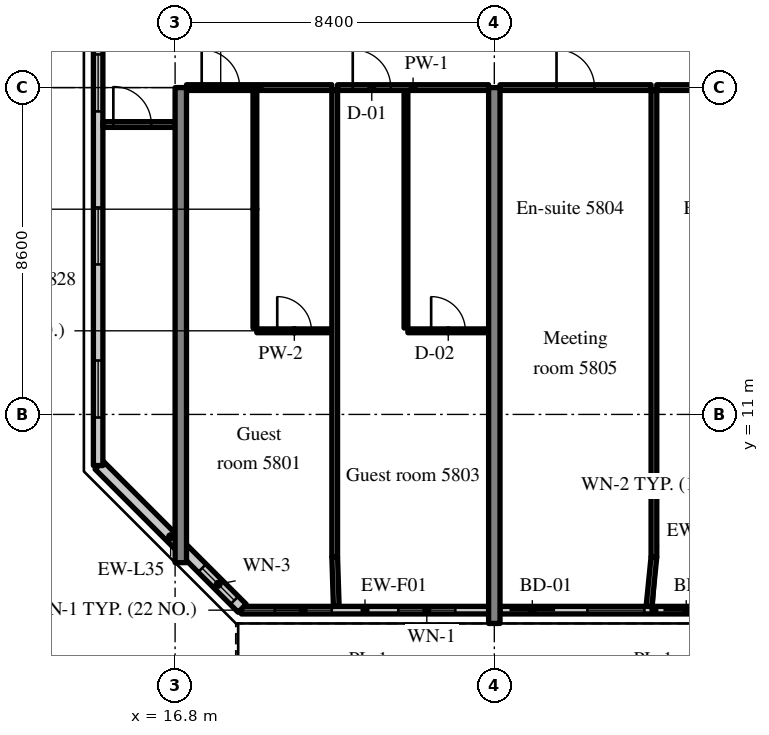
"""IFC4 building model, lengths in metres.
Left out: names, types, materials, properties, quantities, classifications, styles, units other than length and angle.
Written with IfcOpenShell. Run it as: python <this file> out.ifc"""

import sys

from ifc_helpers import new_model, si_unit, direction, frame, frame_2d, origin, place, context, subcontext, project, spatial, rectangle, extrude, source, transform, mapped, element, fill, save


model = new_model("IFC4")
c1 = context("Model", 3, precision=1e-05, world=origin(), true_north=direction((0.0, 1.0)))
c2 = subcontext(c1, "Body", "Model", "MODEL_VIEW")
j1 = project(units=[si_unit("LENGTHUNIT", "METRE"), si_unit("PLANEANGLEUNIT", "RADIAN")], contexts=[c1])
p1 = place(None, origin())
s1 = spatial("IfcSite", under=j1, at=p1, CompositionType="ELEMENT")
p2 = place(p1, origin())
s2 = spatial("IfcBuilding", under=s1, at=p2, CompositionType="ELEMENT")
p3 = place(p2, frame((0.0, 0.0, 241.3)))
s3 = spatial("IfcBuildingStorey", under=s2, at=p3, CompositionType="ELEMENT", Elevation=241.3)
m1 = source(origin(), c2, "Body", "SweptSolid", [
    extrude(rectangle(XDim=12.5, YDim=0.3, at=frame_2d((6.25, 0.0))), origin(), (0.0, 0.0, 1.0), 3.62),
])
p4 = place(p3, frame((16.95, 7.1, 0.0), z_axis=(0.0, 0.0, 1.0), x_axis=(0.0, 1.0, 0.0)))
e1 = element("IfcWall", 1, at=p4, inside=s3, PredefinedType="SHEAR", context=c2, shape_type="MappedRepresentation", body=[
    mapped(m1, transform((0.0, 0.0, 0.0), scale=1.0)),
])
m2 = source(origin(), c2, "Body", "SweptSolid", [
    extrude(rectangle(XDim=14.1, YDim=0.3, at=frame_2d((7.05, 0.0))), origin(), (0.0, 0.0, 1.0), 3.62),
])
p5 = place(p3, frame((25.2, 5.5, 0.0), z_axis=(0.0, 0.0, 1.0), x_axis=(0.0, 1.0, 0.0)))
e2 = element("IfcWall", 2, at=p5, inside=s3, PredefinedType="SHEAR", context=c2, shape_type="MappedRepresentation", body=[
    mapped(m2, transform((0.0, 0.0, 0.0), scale=1.0)),
])
m3 = source(origin(), c2, "Body", "SweptSolid", [
    extrude(rectangle(XDim=6.505, YDim=0.2, at=frame_2d((3.252, 0.0))), origin(), (0.0, 0.0, 1.0), 3.02),
])
p6 = place(p3, frame((18.545, 5.85, 0.0), z_axis=(0.0, 0.0, 1.0), x_axis=(1.0, 0.0, 0.0)))
e3 = element("IfcWall", 3, at=p6, inside=s3, PredefinedType="SOLIDWALL", context=c2, shape_type="MappedRepresentation", body=[
    mapped(m3, transform((0.0, 0.0, 0.0), scale=1.0)),
])
m4 = source(origin(), c2, "Body", "SweptSolid", [
    extrude(rectangle(XDim=1.5, YDim=1.5, at=frame_2d((0.75, 0.75))), frame((0.0, 0.11, 0.0), z_axis=(0.0, -1.0, 0.0), x_axis=(1.0, 0.0, 0.0)), (0.0, 0.0, 1.0), 0.22),
])
p7 = place(p6, frame((0.876, 0.0, 0.9)))
e4 = element("IfcOpeningElement", 4, at=p7, cuts=e3, PredefinedType="OPENING", context=c2, shape_type="MappedRepresentation", body=[
    mapped(m4, transform((0.0, 0.0, 0.0), scale=1.0)),
])
p8 = place(p6, frame((4.129, 0.0, 0.9)))
e5 = element("IfcOpeningElement", 5, at=p8, cuts=e3, PredefinedType="OPENING", context=c2, shape_type="MappedRepresentation", body=[
    mapped(m4, transform((0.0, 0.0, 0.0), scale=1.0)),
])
m5 = source(origin(), c2, "Body", "SweptSolid", [
    extrude(rectangle(XDim=8.1, YDim=0.2, at=frame_2d((4.05, 0.0))), origin(), (0.0, 0.0, 1.0), 3.02),
])
p9 = place(p3, frame((25.35, 5.85, 0.0), z_axis=(0.0, 0.0, 1.0), x_axis=(1.0, 0.0, 0.0)))
e6 = element("IfcWall", 6, at=p9, inside=s3, PredefinedType="SOLIDWALL", context=c2, shape_type="MappedRepresentation", body=[
    mapped(m5, transform((0.0, 0.0, 0.0), scale=1.0)),
])
m6 = source(origin(), c2, "Body", "SweptSolid", [
    extrude(rectangle(XDim=1.2, YDim=2.4, at=frame_2d((0.6, 1.2))), frame((0.0, 0.11, 0.0), z_axis=(0.0, -1.0, 0.0), x_axis=(1.0, 0.0, 0.0)), (0.0, 0.0, 1.0), 0.22),
])
p10 = place(p9, frame((0.25, 0.0, 0.0)))
e7 = element("IfcOpeningElement", 7, at=p10, cuts=e6, PredefinedType="OPENING", context=c2, shape_type="MappedRepresentation", body=[
    mapped(m6, transform((0.0, 0.0, 0.0), scale=1.0)),
])
p11 = place(p9, frame((2.3, 0.0, 0.9)))
e8 = element("IfcOpeningElement", 8, at=p11, cuts=e6, PredefinedType="OPENING", context=c2, shape_type="MappedRepresentation", body=[
    mapped(m4, transform((0.0, 0.0, 0.0), scale=1.0)),
])
p12 = place(p9, frame((4.3, 0.0, 0.0)))
e9 = element("IfcOpeningElement", 9, at=p12, cuts=e6, PredefinedType="OPENING", context=c2, shape_type="MappedRepresentation", body=[
    mapped(m6, transform((0.0, 0.0, 0.0), scale=1.0)),
])
p13 = place(p9, frame((6.35, 0.0, 0.9)))
e10 = element("IfcOpeningElement", 10, at=p13, cuts=e6, PredefinedType="OPENING", context=c2, shape_type="MappedRepresentation", body=[
    mapped(m4, transform((0.0, 0.0, 0.0), scale=1.0)),
])
m7 = source(origin(), c2, "Body", "SweptSolid", [
    extrude(rectangle(XDim=5.326, YDim=0.3, at=frame_2d((2.663, 0.0))), origin(), (0.0, 0.0, 1.0), 3.62),
])
p14 = place(p3, frame((14.8, 9.666, 0.0), z_axis=(0.0, 0.0, 1.0), x_axis=(0.707083859269, -0.707129702361, 0.0)))
e11 = element("IfcWall", 11, at=p14, inside=s3, PredefinedType="SOLIDWALL", context=c2, shape_type="MappedRepresentation", body=[
    mapped(m7, transform((0.0, 0.0, 0.0), scale=1.0)),
])
m8 = source(origin(), c2, "Body", "SweptSolid", [
    extrude(rectangle(XDim=1.2, YDim=1.5, at=frame_2d((0.6, 0.75))), frame((0.0, 0.16, 0.0), z_axis=(0.0, -1.0, 0.0), x_axis=(1.0, 0.0, 0.0)), (0.0, 0.0, 1.0), 0.32),
])
p15 = place(p14, frame((3.833, 0.0, 0.9)))
e12 = element("IfcOpeningElement", 12, at=p15, cuts=e11, PredefinedType="OPENING", context=c2, shape_type="MappedRepresentation", body=[
    mapped(m8, transform((0.0, 0.0, 0.0), scale=1.0)),
])
m9 = source(origin(), c2, "Body", "SweptSolid", [
    extrude(rectangle(XDim=28.189, YDim=0.25, at=frame_2d((14.095, 0.0))), origin(), (0.0, 0.0, 1.0), 3.62),
])
p16 = place(p3, frame((14.775, 37.845, 0.0), z_axis=(0.0, 0.0, 1.0), x_axis=(0.0, -1.0, 0.0)))
e13 = element("IfcWall", 13, at=p16, inside=s3, PredefinedType="SOLIDWALL", context=c2, shape_type="MappedRepresentation", body=[
    mapped(m9, transform((0.0, 0.0, 0.0), scale=1.0)),
])
m10 = source(origin(), c2, "Body", "SweptSolid", [
    extrude(rectangle(XDim=1.5, YDim=1.5, at=frame_2d((0.75, 0.75))), frame((0.0, 0.135, 0.0), z_axis=(0.0, -1.0, 0.0), x_axis=(1.0, 0.0, 0.0)), (0.0, 0.0, 1.0), 0.27),
])
p17 = place(p16, frame((1.263, 0.0, 0.9)))
e14 = element("IfcOpeningElement", 14, at=p17, cuts=e13, PredefinedType="OPENING", context=c2, shape_type="MappedRepresentation", body=[
    mapped(m10, transform((0.0, 0.0, 0.0), scale=1.0)),
])
p18 = place(p16, frame((5.291, 0.0, 0.9)))
e15 = element("IfcOpeningElement", 15, at=p18, cuts=e13, PredefinedType="OPENING", context=c2, shape_type="MappedRepresentation", body=[
    mapped(m10, transform((0.0, 0.0, 0.0), scale=1.0)),
])
p19 = place(p16, frame((9.318, 0.0, 0.9)))
e16 = element("IfcOpeningElement", 16, at=p19, cuts=e13, PredefinedType="OPENING", context=c2, shape_type="MappedRepresentation", body=[
    mapped(m10, transform((0.0, 0.0, 0.0), scale=1.0)),
])
p20 = place(p16, frame((13.345, 0.0, 0.9)))
e17 = element("IfcOpeningElement", 17, at=p20, cuts=e13, PredefinedType="OPENING", context=c2, shape_type="MappedRepresentation", body=[
    mapped(m10, transform((0.0, 0.0, 0.0), scale=1.0)),
])
p21 = place(p16, frame((17.372, 0.0, 0.9)))
e18 = element("IfcOpeningElement", 18, at=p21, cuts=e13, PredefinedType="OPENING", context=c2, shape_type="MappedRepresentation", body=[
    mapped(m10, transform((0.0, 0.0, 0.0), scale=1.0)),
])
p22 = place(p16, frame((21.399, 0.0, 0.9)))
e19 = element("IfcOpeningElement", 19, at=p22, cuts=e13, PredefinedType="OPENING", context=c2, shape_type="MappedRepresentation", body=[
    mapped(m10, transform((0.0, 0.0, 0.0), scale=1.0)),
])
p23 = place(p16, frame((25.426, 0.0, 0.9)))
e20 = element("IfcOpeningElement", 20, at=p23, cuts=e13, PredefinedType="OPENING", context=c2, shape_type="MappedRepresentation", body=[
    mapped(m10, transform((0.0, 0.0, 0.0), scale=1.0)),
])
m11 = source(origin(), c2, "Body", "SweptSolid", [
    extrude(rectangle(XDim=6.25, YDim=0.1, at=frame_2d((3.125, 0.0))), origin(), (0.0, 0.0, 1.0), 3.62),
])
p24 = place(p3, frame((18.9, 13.275, 0.0), z_axis=(0.0, 0.0, 1.0), x_axis=(0.0, 1.0, 0.0)))
e21 = element("IfcWall", 21, at=p24, inside=s3, PredefinedType="PARTITIONING", context=c2, shape_type="MappedRepresentation", body=[
    mapped(m11, transform((0.0, 0.0, 0.0), scale=1.0)),
])
m12 = source(origin(), c2, "Body", "SweptSolid", [
    extrude(rectangle(XDim=1.975, YDim=0.1, at=frame_2d((0.988, 0.0))), origin(), (0.0, 0.0, 1.0), 3.62),
])
p25 = place(p3, frame((18.95, 13.2, 0.0), z_axis=(0.0, 0.0, 1.0), x_axis=(1.0, 0.0, 0.0)))
e22 = element("IfcWall", 22, at=p25, inside=s3, PredefinedType="PARTITIONING", context=c2, shape_type="MappedRepresentation", body=[
    mapped(m12, transform((0.0, 0.0, 0.0), scale=1.0)),
])
m13 = source(origin(), c2, "Body", "SweptSolid", [
    extrude(rectangle(XDim=0.9, YDim=2.1, at=frame_2d((0.45, 1.05))), frame((0.0, 0.06, 0.0), z_axis=(0.0, -1.0, 0.0), x_axis=(1.0, 0.0, 0.0)), (0.0, 0.0, 1.0), 0.12),
])
p26 = place(p25, frame((0.538, 0.0, 0.0)))
e23 = element("IfcOpeningElement", 23, at=p26, cuts=e22, PredefinedType="OPENING", context=c2, shape_type="MappedRepresentation", body=[
    mapped(m13, transform((0.0, 0.0, 0.0), scale=1.0)),
])
m14 = source(origin(), c2, "Body", "SweptSolid", [
    extrude(rectangle(XDim=3.825, YDim=0.15, at=frame_2d((1.913, 0.0))), origin(), (0.0, 0.0, 1.0), 2.92),
])
p27 = place(p3, frame((17.1, 19.6, 0.0), z_axis=(0.0, 0.0, 1.0), x_axis=(1.0, 0.0, 0.0)))
e24 = element("IfcWall", 24, at=p27, inside=s3, PredefinedType="PARTITIONING", context=c2, shape_type="MappedRepresentation", body=[
    mapped(m14, transform((0.0, 0.0, 0.0), scale=1.0)),
])
m15 = source(origin(), c2, "Body", "SweptSolid", [
    extrude(rectangle(XDim=1.0, YDim=2.1, at=frame_2d((0.5, 1.05))), frame((0.0, 0.085, 0.0), z_axis=(0.0, -1.0, 0.0), x_axis=(1.0, 0.0, 0.0)), (0.0, 0.0, 1.0), 0.17),
])
p28 = place(p27, frame((0.4, 0.0, 0.0)))
e25 = element("IfcOpeningElement", 25, at=p28, cuts=e24, PredefinedType="OPENING", context=c2, shape_type="MappedRepresentation", body=[
    mapped(m15, transform((0.0, 0.0, 0.0), scale=1.0)),
])
p29 = place(p3, frame((22.875, 13.275, 0.0), z_axis=(0.0, 0.0, 1.0), x_axis=(0.0, 1.0, 0.0)))
e26 = element("IfcWall", 26, at=p29, inside=s3, PredefinedType="PARTITIONING", context=c2, shape_type="MappedRepresentation", body=[
    mapped(m11, transform((0.0, 0.0, 0.0), scale=1.0)),
])
m16 = source(origin(), c2, "Body", "SweptSolid", [
    extrude(rectangle(XDim=2.125, YDim=0.1, at=frame_2d((1.062, 0.0))), origin(), (0.0, 0.0, 1.0), 3.62),
])
p30 = place(p3, frame((22.925, 13.2, 0.0), z_axis=(0.0, 0.0, 1.0), x_axis=(1.0, 0.0, 0.0)))
e27 = element("IfcWall", 27, at=p30, inside=s3, PredefinedType="PARTITIONING", context=c2, shape_type="MappedRepresentation", body=[
    mapped(m16, transform((0.0, 0.0, 0.0), scale=1.0)),
])
p31 = place(p30, frame((0.613, 0.0, 0.0)))
e28 = element("IfcOpeningElement", 28, at=p31, cuts=e27, PredefinedType="OPENING", context=c2, shape_type="MappedRepresentation", body=[
    mapped(m13, transform((0.0, 0.0, 0.0), scale=1.0)),
])
m17 = source(origin(), c2, "Body", "SweptSolid", [
    extrude(rectangle(XDim=3.975, YDim=0.15, at=frame_2d((1.988, 0.0))), origin(), (0.0, 0.0, 1.0), 2.92),
])
p32 = place(p3, frame((21.075, 19.6, 0.0), z_axis=(0.0, 0.0, 1.0), x_axis=(1.0, 0.0, 0.0)))
e29 = element("IfcWall", 29, at=p32, inside=s3, PredefinedType="PARTITIONING", context=c2, shape_type="MappedRepresentation", body=[
    mapped(m17, transform((0.0, 0.0, 0.0), scale=1.0)),
])
p33 = place(p32, frame((0.4, 0.0, 0.0)))
e30 = element("IfcOpeningElement", 30, at=p33, cuts=e29, PredefinedType="OPENING", context=c2, shape_type="MappedRepresentation", body=[
    mapped(m15, transform((0.0, 0.0, 0.0), scale=1.0)),
])
m18 = source(origin(), c2, "Body", "SweptSolid", [
    extrude(rectangle(XDim=12.275, YDim=0.15, at=frame_2d((6.137, 0.0))), origin(), (0.0, 0.0, 1.0), 3.62),
])
p34 = place(p3, frame((21.0, 7.25, 0.0), z_axis=(0.0, 0.0, 1.0), x_axis=(0.0, 1.0, 0.0)))
e31 = element("IfcWall", 31, at=p34, inside=s3, PredefinedType="PARTITIONING", context=c2, shape_type="MappedRepresentation", body=[
    mapped(m18, transform((0.0, 0.0, 0.0), scale=1.0)),
])
m19 = source(origin(), c2, "Body", "SweptSolid", [
    extrude(rectangle(XDim=3.975, YDim=0.15, at=frame_2d((1.987, 0.0))), origin(), (0.0, 0.0, 1.0), 2.92),
])
p35 = place(p3, frame((25.35, 19.6, 0.0), z_axis=(0.0, 0.0, 1.0), x_axis=(1.0, 0.0, 0.0)))
e32 = element("IfcWall", 32, at=p35, inside=s3, PredefinedType="PARTITIONING", context=c2, shape_type="MappedRepresentation", body=[
    mapped(m19, transform((0.0, 0.0, 0.0), scale=1.0)),
])
p36 = place(p35, frame((1.487, 0.0, 0.0)))
e33 = element("IfcOpeningElement", 33, at=p36, cuts=e32, PredefinedType="OPENING", context=c2, shape_type="MappedRepresentation", body=[
    mapped(m15, transform((0.0, 0.0, 0.0), scale=1.0)),
])
p37 = place(p3, frame((29.475, 19.6, 0.0), z_axis=(0.0, 0.0, 1.0), x_axis=(1.0, 0.0, 0.0)))
e34 = element("IfcWall", 34, at=p37, inside=s3, PredefinedType="PARTITIONING", context=c2, shape_type="MappedRepresentation", body=[
    mapped(m19, transform((0.0, 0.0, 0.0), scale=1.0)),
])
p38 = place(p37, frame((1.487, 0.0, 0.0)))
e35 = element("IfcOpeningElement", 35, at=p38, cuts=e34, PredefinedType="OPENING", context=c2, shape_type="MappedRepresentation", body=[
    mapped(m15, transform((0.0, 0.0, 0.0), scale=1.0)),
])
p39 = place(p3, frame((29.4, 7.25, 0.0), z_axis=(0.0, 0.0, 1.0), x_axis=(0.0, 1.0, 0.0)))
e36 = element("IfcWall", 36, at=p39, inside=s3, PredefinedType="PARTITIONING", context=c2, shape_type="MappedRepresentation", body=[
    mapped(m18, transform((0.0, 0.0, 0.0), scale=1.0)),
])
m20 = source(origin(), c2, "Body", "SweptSolid", [
    extrude(rectangle(XDim=1.9, YDim=0.15, at=frame_2d((0.95, 0.0))), origin(), (0.0, 0.0, 1.0), 2.92),
])
p40 = place(p3, frame((14.9, 18.628, 0.0), z_axis=(0.0, 0.0, 1.0), x_axis=(1.0, 0.0, 0.0)))
e37 = element("IfcWall", 37, at=p40, inside=s3, PredefinedType="PARTITIONING", context=c2, shape_type="MappedRepresentation", body=[
    mapped(m20, transform((0.0, 0.0, 0.0), scale=1.0)),
])
p41 = place(p40, frame((0.275, 0.0, 0.0)))
e38 = element("IfcOpeningElement", 38, at=p41, cuts=e37, PredefinedType="OPENING", context=c2, shape_type="MappedRepresentation", body=[
    mapped(m15, transform((0.0, 0.0, 0.0), scale=1.0)),
])
m21 = source(origin(), c2, "Body", "SweptSolid", [
    extrude(rectangle(XDim=1.301, YDim=0.15, at=frame_2d((0.65, 0.0))), origin(), (0.0, 0.0, 1.0), 3.62),
])
p42 = place(p3, frame((21.041, 5.95, 0.0), z_axis=(0.0, 0.0, 1.0), x_axis=(-0.031533606063, 0.999502692187, 0.0)))
e39 = element("IfcWall", 39, at=p42, inside=s3, PredefinedType="PARTITIONING", context=c2, shape_type="MappedRepresentation", body=[
    mapped(m21, transform((0.0, 0.0, 0.0), scale=1.0)),
])
m22 = source(origin(), c2, "Body", "SweptSolid", [
    extrude(rectangle(XDim=1.307, YDim=0.15, at=frame_2d((0.653, 0.0))), origin(), (0.0, 0.0, 1.0), 3.62),
])
p43 = place(p3, frame((29.27, 5.95, 0.0), z_axis=(0.0, 0.0, 1.0), x_axis=(0.099411212066, 0.995046436562, 0.0)))
e40 = element("IfcWall", 40, at=p43, inside=s3, PredefinedType="PARTITIONING", context=c2, shape_type="MappedRepresentation", body=[
    mapped(m22, transform((0.0, 0.0, 0.0), scale=1.0)),
])
m23 = source(origin(), c2, "Body", "SweptSolid", [
    extrude(rectangle(XDim=1.5, YDim=1.5, at=frame_2d((0.75, 0.75))), frame((0.0, 0.03, 0.0), z_axis=(0.0, -1.0, 0.0), x_axis=(1.0, 0.0, 0.0)), (0.0, 0.0, 1.0), 0.06),
])
p44 = place(p7, origin())
e41 = element("IfcWindow", 41, at=p44, inside=s3, PartitioningType="SINGLE_PANEL", PredefinedType="WINDOW", context=c2, shape_type="MappedRepresentation", body=[
    mapped(m23, transform((0.0, 0.0, 0.0), scale=1.0)),
])
fill(e4, e41)
p45 = place(p8, origin())
e42 = element("IfcWindow", 42, at=p45, inside=s3, PartitioningType="SINGLE_PANEL", PredefinedType="WINDOW", context=c2, shape_type="MappedRepresentation", body=[
    mapped(m23, transform((0.0, 0.0, 0.0), scale=1.0)),
])
fill(e5, e42)
m24 = source(origin(), c2, "Body", "SweptSolid", [
    extrude(rectangle(XDim=1.2, YDim=2.4, at=frame_2d((0.6, 1.2))), frame((0.0, 0.025, 0.0), z_axis=(0.0, -1.0, 0.0), x_axis=(1.0, 0.0, 0.0)), (0.0, 0.0, 1.0), 0.05),
])
p46 = place(p10, origin())
e43 = element("IfcDoor", 43, at=p46, inside=s3, OperationType="SLIDING_TO_LEFT", PredefinedType="DOOR", context=c2, shape_type="MappedRepresentation", body=[
    mapped(m24, transform((0.0, 0.0, 0.0), scale=1.0)),
])
fill(e7, e43)
p47 = place(p11, origin())
e44 = element("IfcWindow", 44, at=p47, inside=s3, PartitioningType="SINGLE_PANEL", PredefinedType="WINDOW", context=c2, shape_type="MappedRepresentation", body=[
    mapped(m23, transform((0.0, 0.0, 0.0), scale=1.0)),
])
fill(e8, e44)
p48 = place(p12, origin())
e45 = element("IfcDoor", 45, at=p48, inside=s3, OperationType="SLIDING_TO_RIGHT", PredefinedType="DOOR", context=c2, shape_type="MappedRepresentation", body=[
    mapped(m24, transform((0.0, 0.0, 0.0), scale=1.0)),
])
fill(e9, e45)
m25 = source(origin(), c2, "Body", "SweptSolid", [
    extrude(rectangle(XDim=1.2, YDim=1.5, at=frame_2d((0.6, 0.75))), frame((0.0, 0.03, 0.0), z_axis=(0.0, -1.0, 0.0), x_axis=(1.0, 0.0, 0.0)), (0.0, 0.0, 1.0), 0.06),
])
p49 = place(p15, origin())
e46 = element("IfcWindow", 46, at=p49, inside=s3, PartitioningType="SINGLE_PANEL", PredefinedType="WINDOW", context=c2, shape_type="MappedRepresentation", body=[
    mapped(m25, transform((0.0, 0.0, 0.0), scale=1.0)),
])
fill(e12, e46)
p50 = place(p21, origin())
e47 = element("IfcWindow", 47, at=p50, inside=s3, PartitioningType="SINGLE_PANEL", PredefinedType="WINDOW", context=c2, shape_type="MappedRepresentation", body=[
    mapped(m23, transform((0.0, 0.0, 0.0), scale=1.0)),
])
fill(e18, e47)
p51 = place(p22, origin())
e48 = element("IfcWindow", 48, at=p51, inside=s3, PartitioningType="SINGLE_PANEL", PredefinedType="WINDOW", context=c2, shape_type="MappedRepresentation", body=[
    mapped(m23, transform((0.0, 0.0, 0.0), scale=1.0)),
])
fill(e19, e48)
p52 = place(p23, origin())
e49 = element("IfcWindow", 49, at=p52, inside=s3, PartitioningType="SINGLE_PANEL", PredefinedType="WINDOW", context=c2, shape_type="MappedRepresentation", body=[
    mapped(m23, transform((0.0, 0.0, 0.0), scale=1.0)),
])
fill(e20, e49)
m26 = source(origin(), c2, "Body", "SweptSolid", [
    extrude(rectangle(XDim=0.9, YDim=2.1, at=frame_2d((0.45, 1.05))), frame((0.0, 0.025, 0.0), z_axis=(0.0, -1.0, 0.0), x_axis=(1.0, 0.0, 0.0)), (0.0, 0.0, 1.0), 0.05),
])
p53 = place(p26, origin())
e50 = element("IfcDoor", 50, at=p53, inside=s3, OperationType="SINGLE_SWING_LEFT", PredefinedType="DOOR", context=c2, shape_type="MappedRepresentation", body=[
    mapped(m26, transform((0.0, 0.0, 0.0), scale=1.0)),
])
fill(e23, e50)
m27 = source(origin(), c2, "Body", "SweptSolid", [
    extrude(rectangle(XDim=1.0, YDim=2.1, at=frame_2d((0.5, 1.05))), frame((0.0, 0.025, 0.0), z_axis=(0.0, -1.0, 0.0), x_axis=(1.0, 0.0, 0.0)), (0.0, 0.0, 1.0), 0.05),
])
p54 = place(p28, origin())
e51 = element("IfcDoor", 51, at=p54, inside=s3, OperationType="SINGLE_SWING_LEFT", PredefinedType="DOOR", context=c2, shape_type="MappedRepresentation", body=[
    mapped(m27, transform((0.0, 0.0, 0.0), scale=1.0)),
])
fill(e25, e51)
p55 = place(p31, origin())
e52 = element("IfcDoor", 52, at=p55, inside=s3, OperationType="SINGLE_SWING_LEFT", PredefinedType="DOOR", context=c2, shape_type="MappedRepresentation", body=[
    mapped(m26, transform((0.0, 0.0, 0.0), scale=1.0)),
])
fill(e28, e52)
p56 = place(p33, origin())
e53 = element("IfcDoor", 53, at=p56, inside=s3, OperationType="SINGLE_SWING_LEFT", PredefinedType="DOOR", context=c2, shape_type="MappedRepresentation", body=[
    mapped(m27, transform((0.0, 0.0, 0.0), scale=1.0)),
])
fill(e30, e53)
p57 = place(p36, origin())
e54 = element("IfcDoor", 54, at=p57, inside=s3, OperationType="SINGLE_SWING_LEFT", PredefinedType="DOOR", context=c2, shape_type="MappedRepresentation", body=[
    mapped(m27, transform((0.0, 0.0, 0.0), scale=1.0)),
])
fill(e33, e54)
p58 = place(p41, origin())
e55 = element("IfcDoor", 55, at=p58, inside=s3, OperationType="SINGLE_SWING_LEFT", PredefinedType="DOOR", context=c2, shape_type="MappedRepresentation", body=[
    mapped(m27, transform((0.0, 0.0, 0.0), scale=1.0)),
])
fill(e38, e55)
save(model, sys.argv[1])
